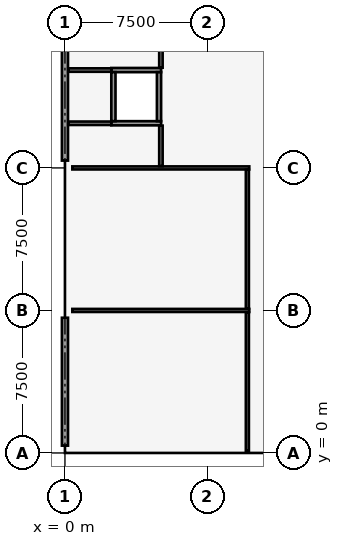
"""IFC4 building model, lengths in metres.
Left out: names, types, materials, properties, quantities, classifications, styles, units other than length and angle.
Written with IfcOpenShell. Run it as: python <this file> out.ifc"""

import sys

from ifc_helpers import new_model, si_unit, direction, frame, frame_2d, origin, origin_2d, place, context, subcontext, project, spatial, rectangle, circle, extrude, element, fill, save


model = new_model("IFC4")
c1 = context("Model", 3, precision=1e-05, world=origin(), true_north=direction((0.0, 1.0)))
c2 = subcontext(c1, "Body", "Model", "MODEL_VIEW")
j1 = project(units=[si_unit("LENGTHUNIT", "METRE"), si_unit("PLANEANGLEUNIT", "RADIAN")], contexts=[c1])
p1 = place(None, origin())
s1 = spatial("IfcSite", under=j1, at=p1, CompositionType="ELEMENT")
p2 = place(p1, origin())
s2 = spatial("IfcBuilding", under=s1, at=p2, CompositionType="ELEMENT")
p3 = place(p2, frame((0.0, 0.0, 4.8)))
s3 = spatial("IfcBuildingStorey", under=s2, at=p3, CompositionType="ELEMENT", Elevation=4.8)
for number, where, z_axis, x_axis in (
    (1, (0.0, 0.0, 0.0), (0.0, 0.0, 1.0), (1.0, 0.0, 0.0)),
    (2, (0.0, 7.5, 0.0), (0.0, 0.0, 1.0), (1.0, 0.0, 0.0)),
    (3, (0.0, 15.0, 0.0), (0.0, 0.0, 1.0), (1.0, 0.0, 0.0)),
):
    element("IfcColumn", number, at=place(p3, frame(where, z_axis=z_axis, x_axis=x_axis)), inside=s3, PredefinedType="COLUMN", context=c2, shape_type="SweptSolid", body=[
        extrude(circle(Radius=0.375, at=origin_2d()), origin(), (0.0, 0.0, 1.0), 4.2),
    ])
p4 = place(p3, frame((0.0, 0.385, 0.0), z_axis=(0.0, 0.0, 1.0), x_axis=(0.0, 1.0, 0.0)))
e4 = element("IfcWall", 4, at=p4, inside=s3, PredefinedType="SOLIDWALL", context=c2, shape_type="SweptSolid", body=[
    extrude(rectangle(XDim=6.73, YDim=0.32, at=frame_2d((3.365, 0.0))), origin(), (0.0, 0.0, 1.0), 2.89),
])
p5 = place(p4, frame((1.175, 0.0, 0.6)))
e5 = element("IfcOpeningElement", 5, at=p5, cuts=e4, PredefinedType="OPENING", context=c2, shape_type="SweptSolid", body=[
    extrude(rectangle(XDim=1.25, YDim=1.8, at=frame_2d((0.625, 0.9))), frame((0.0, 0.17, 0.0), z_axis=(0.0, -1.0, 0.0), x_axis=(1.0, 0.0, 0.0)), (0.0, 0.0, 1.0), 0.34),
])
p6 = place(p4, frame((4.355, 0.0, 0.6)))
e6 = element("IfcOpeningElement", 6, at=p6, cuts=e4, PredefinedType="OPENING", context=c2, shape_type="SweptSolid", body=[
    extrude(rectangle(XDim=1.15, YDim=1.3, at=frame_2d((0.575, 0.65))), frame((0.0, 0.17, 0.0), z_axis=(0.0, -1.0, 0.0), x_axis=(1.0, 0.0, 0.0)), (0.0, 0.0, 1.0), 0.34),
])
p7 = place(p3, frame((0.0, 15.385, 0.0), z_axis=(0.0, 0.0, 1.0), x_axis=(0.0, 1.0, 0.0)))
e7 = element("IfcWall", 7, at=p7, inside=s3, PredefinedType="SOLIDWALL", context=c2, shape_type="SweptSolid", body=[
    extrude(rectangle(XDim=6.73, YDim=0.32, at=frame_2d((3.365, 0.0))), origin(), (0.0, 0.0, 1.0), 2.89),
])
p8 = place(p7, frame((0.192, 0.0, 0.6)))
e8 = element("IfcOpeningElement", 8, at=p8, cuts=e7, PredefinedType="OPENING", context=c2, shape_type="SweptSolid", body=[
    extrude(rectangle(XDim=1.55, YDim=1.8, at=frame_2d((0.775, 0.9))), frame((0.0, 0.17, 0.0), z_axis=(0.0, -1.0, 0.0), x_axis=(1.0, 0.0, 0.0)), (0.0, 0.0, 1.0), 0.34),
])
p9 = place(p7, frame((2.64, 0.0, 0.6)))
e9 = element("IfcOpeningElement", 9, at=p9, cuts=e7, PredefinedType="OPENING", context=c2, shape_type="SweptSolid", body=[
    extrude(rectangle(XDim=1.45, YDim=1.3, at=frame_2d((0.725, 0.65))), frame((0.0, 0.17, 0.0), z_axis=(0.0, -1.0, 0.0), x_axis=(1.0, 0.0, 0.0)), (0.0, 0.0, 1.0), 0.34),
])
for number, where, z_axis, x_axis in (
    (10, (2.44, 17.35, 0.0), (0.0, 0.0, 1.0), (1.0, 0.0, 0.0)),
    (11, (2.44, 20.15, 0.0), (0.0, 0.0, 1.0), (1.0, 0.0, 0.0)),
):
    element("IfcWall", number, at=place(p3, frame(where, z_axis=z_axis, x_axis=x_axis)), inside=s3, PredefinedType="SOLIDWALL", context=c2, shape_type="SweptSolid", body=[
        extrude(rectangle(XDim=2.62, YDim=0.22, at=frame_2d((1.31, 0.0))), origin(), (0.0, 0.0, 1.0), 3.92),
    ])
p10 = place(p3, frame((2.55, 17.46, 0.0), z_axis=(0.0, 0.0, 1.0), x_axis=(0.0, 1.0, 0.0)))
e12 = element("IfcWall", 12, at=p10, inside=s3, PredefinedType="SOLIDWALL", context=c2, shape_type="SweptSolid", body=[
    extrude(rectangle(XDim=2.58, YDim=0.22, at=frame_2d((1.29, 0.0))), origin(), (0.0, 0.0, 1.0), 3.92),
])
p11 = place(p3, frame((4.95, 17.46, 0.0), z_axis=(0.0, 0.0, 1.0), x_axis=(0.0, 1.0, 0.0)))
e13 = element("IfcWall", 13, at=p11, inside=s3, PredefinedType="SOLIDWALL", context=c2, shape_type="SweptSolid", body=[
    extrude(rectangle(XDim=2.58, YDim=0.22, at=frame_2d((1.29, 0.0))), origin(), (0.0, 0.0, 1.0), 3.92),
])
p12 = place(p11, frame((0.79, 0.0, 0.0)))
e14 = element("IfcOpeningElement", 14, at=p12, cuts=e13, PredefinedType="OPENING", context=c2, shape_type="SweptSolid", body=[
    extrude(rectangle(XDim=1.0, YDim=2.15, at=frame_2d((0.5, 1.075))), frame((0.0, 0.12, 0.0), z_axis=(0.0, -1.0, 0.0), x_axis=(1.0, 0.0, 0.0)), (0.0, 0.0, 1.0), 0.24),
])
for number, where, z_axis, x_axis in (
    (15, (0.389, 7.5, 0.0), (0.0, 0.0, 1.0), (1.0, 0.0, 0.0)),
    (16, (0.389, 15.0, 0.0), (0.0, 0.0, 1.0), (1.0, 0.0, 0.0)),
):
    element("IfcWall", number, at=place(p3, frame(where, z_axis=z_axis, x_axis=x_axis)), inside=s3, PredefinedType="PARTITIONING", context=c2, shape_type="SweptSolid", body=[
        extrude(rectangle(XDim=9.311, YDim=0.16, at=frame_2d((4.656, 0.0))), origin(), (0.0, 0.0, 1.0), 2.89),
    ])
p13 = place(p3, frame((9.6, 0.112, 0.0), z_axis=(0.0, 0.0, 1.0), x_axis=(0.0, 1.0, 0.0)))
e17 = element("IfcWall", 17, at=p13, inside=s3, PredefinedType="PARTITIONING", context=c2, shape_type="SweptSolid", body=[
    extrude(rectangle(XDim=7.294, YDim=0.16, at=frame_2d((3.647, 0.0))), origin(), (0.0, 0.0, 1.0), 2.89),
])
p14 = place(p13, frame((3.188, 0.0, 0.0)))
e18 = element("IfcOpeningElement", 18, at=p14, cuts=e17, PredefinedType="OPENING", context=c2, shape_type="SweptSolid", body=[
    extrude(rectangle(XDim=0.9, YDim=2.1, at=frame_2d((0.45, 1.05))), frame((0.0, 0.09, 0.0), z_axis=(0.0, -1.0, 0.0), x_axis=(1.0, 0.0, 0.0)), (0.0, 0.0, 1.0), 0.18),
])
p15 = place(p3, frame((9.6, 7.594, 0.0), z_axis=(0.0, 0.0, 1.0), x_axis=(0.0, 1.0, 0.0)))
e19 = element("IfcWall", 19, at=p15, inside=s3, PredefinedType="PARTITIONING", context=c2, shape_type="SweptSolid", body=[
    extrude(rectangle(XDim=7.312, YDim=0.16, at=frame_2d((3.656, 0.0))), origin(), (0.0, 0.0, 1.0), 2.89),
])
p16 = place(p15, frame((3.206, 0.0, 0.0)))
e20 = element("IfcOpeningElement", 20, at=p16, cuts=e19, PredefinedType="OPENING", context=c2, shape_type="SweptSolid", body=[
    extrude(rectangle(XDim=0.9, YDim=2.1, at=frame_2d((0.45, 1.05))), frame((0.0, 0.09, 0.0), z_axis=(0.0, -1.0, 0.0), x_axis=(1.0, 0.0, 0.0)), (0.0, 0.0, 1.0), 0.18),
])
for number, where, z_axis, x_axis in (
    (21, (0.174, 17.35, 0.0), (0.0, 0.0, 1.0), (1.0, 0.0, 0.0)),
    (22, (0.174, 20.15, 0.0), (0.0, 0.0, 1.0), (1.0, 0.0, 0.0)),
):
    element("IfcWall", number, at=place(p3, frame(where, z_axis=z_axis, x_axis=x_axis)), inside=s3, PredefinedType="PARTITIONING", context=c2, shape_type="SweptSolid", body=[
        extrude(rectangle(XDim=2.266, YDim=0.18, at=frame_2d((1.133, 0.0))), origin(), (0.0, 0.0, 1.0), 3.14),
    ])
p17 = place(p3, frame((5.05, 15.094, 0.0), z_axis=(0.0, 0.0, 1.0), x_axis=(0.0, 1.0, 0.0)))
e23 = element("IfcWall", 23, at=p17, inside=s3, PredefinedType="PARTITIONING", context=c2, shape_type="SweptSolid", body=[
    extrude(rectangle(XDim=2.132, YDim=0.18, at=frame_2d((1.066, 0.0))), origin(), (0.0, 0.0, 1.0), 2.89),
])
p18 = place(p3, frame((5.05, 20.274, 0.0), z_axis=(0.0, 0.0, 1.0), x_axis=(0.0, 1.0, 0.0)))
e24 = element("IfcWall", 24, at=p18, inside=s3, PredefinedType="PARTITIONING", context=c2, shape_type="SweptSolid", body=[
    extrude(rectangle(XDim=3.462, YDim=0.18, at=frame_2d((1.731, 0.0))), origin(), (0.0, 0.0, 1.0), 2.89),
])
p19 = place(p5, origin())
e25 = element("IfcWindow", 25, at=p19, inside=s3, PartitioningType="SINGLE_PANEL", PredefinedType="WINDOW", context=c2, shape_type="SweptSolid", body=[
    extrude(rectangle(XDim=1.25, YDim=1.8, at=frame_2d((0.625, 0.9))), frame((0.0, 0.03, 0.0), z_axis=(0.0, -1.0, 0.0), x_axis=(1.0, 0.0, 0.0)), (0.0, 0.0, 1.0), 0.06),
])
fill(e5, e25)
p20 = place(p6, origin())
e26 = element("IfcWindow", 26, at=p20, inside=s3, PartitioningType="SINGLE_PANEL", PredefinedType="WINDOW", context=c2, shape_type="SweptSolid", body=[
    extrude(rectangle(XDim=1.15, YDim=1.3, at=frame_2d((0.575, 0.65))), frame((0.0, 0.03, 0.0), z_axis=(0.0, -1.0, 0.0), x_axis=(1.0, 0.0, 0.0)), (0.0, 0.0, 1.0), 0.06),
])
fill(e6, e26)
p21 = place(p8, origin())
e27 = element("IfcWindow", 27, at=p21, inside=s3, PartitioningType="SINGLE_PANEL", PredefinedType="WINDOW", context=c2, shape_type="SweptSolid", body=[
    extrude(rectangle(XDim=1.55, YDim=1.8, at=frame_2d((0.775, 0.9))), frame((0.0, 0.03, 0.0), z_axis=(0.0, -1.0, 0.0), x_axis=(1.0, 0.0, 0.0)), (0.0, 0.0, 1.0), 0.06),
])
fill(e8, e27)
p22 = place(p9, origin())
e28 = element("IfcWindow", 28, at=p22, inside=s3, PartitioningType="SINGLE_PANEL", PredefinedType="WINDOW", context=c2, shape_type="SweptSolid", body=[
    extrude(rectangle(XDim=1.45, YDim=1.3, at=frame_2d((0.725, 0.65))), frame((0.0, 0.03, 0.0), z_axis=(0.0, -1.0, 0.0), x_axis=(1.0, 0.0, 0.0)), (0.0, 0.0, 1.0), 0.06),
])
fill(e9, e28)
p23 = place(p12, origin())
e29 = element("IfcDoor", 29, at=p23, inside=s3, OperationType="SLIDING_TO_LEFT", PredefinedType="DOOR", context=c2, shape_type="SweptSolid", body=[
    extrude(rectangle(XDim=1.0, YDim=2.15, at=frame_2d((0.5, 1.075))), frame((0.0, 0.025, 0.0), z_axis=(0.0, -1.0, 0.0), x_axis=(1.0, 0.0, 0.0)), (0.0, 0.0, 1.0), 0.05),
])
fill(e14, e29)
p24 = place(p14, origin())
e30 = element("IfcDoor", 30, at=p24, inside=s3, OperationType="SINGLE_SWING_LEFT", PredefinedType="DOOR", context=c2, shape_type="SweptSolid", body=[
    extrude(rectangle(XDim=0.9, YDim=2.1, at=frame_2d((0.45, 1.05))), frame((0.0, 0.025, 0.0), z_axis=(0.0, -1.0, 0.0), x_axis=(1.0, 0.0, 0.0)), (0.0, 0.0, 1.0), 0.05),
])
fill(e18, e30)
p25 = place(p16, origin())
e31 = element("IfcDoor", 31, at=p25, inside=s3, OperationType="SINGLE_SWING_RIGHT", PredefinedType="DOOR", context=c2, shape_type="SweptSolid", body=[
    extrude(rectangle(XDim=0.9, YDim=2.1, at=frame_2d((0.45, 1.05))), frame((0.0, 0.025, 0.0), z_axis=(0.0, -1.0, 0.0), x_axis=(1.0, 0.0, 0.0)), (0.0, 0.0, 1.0), 0.05),
])
fill(e20, e31)
save(model, sys.argv[1])
